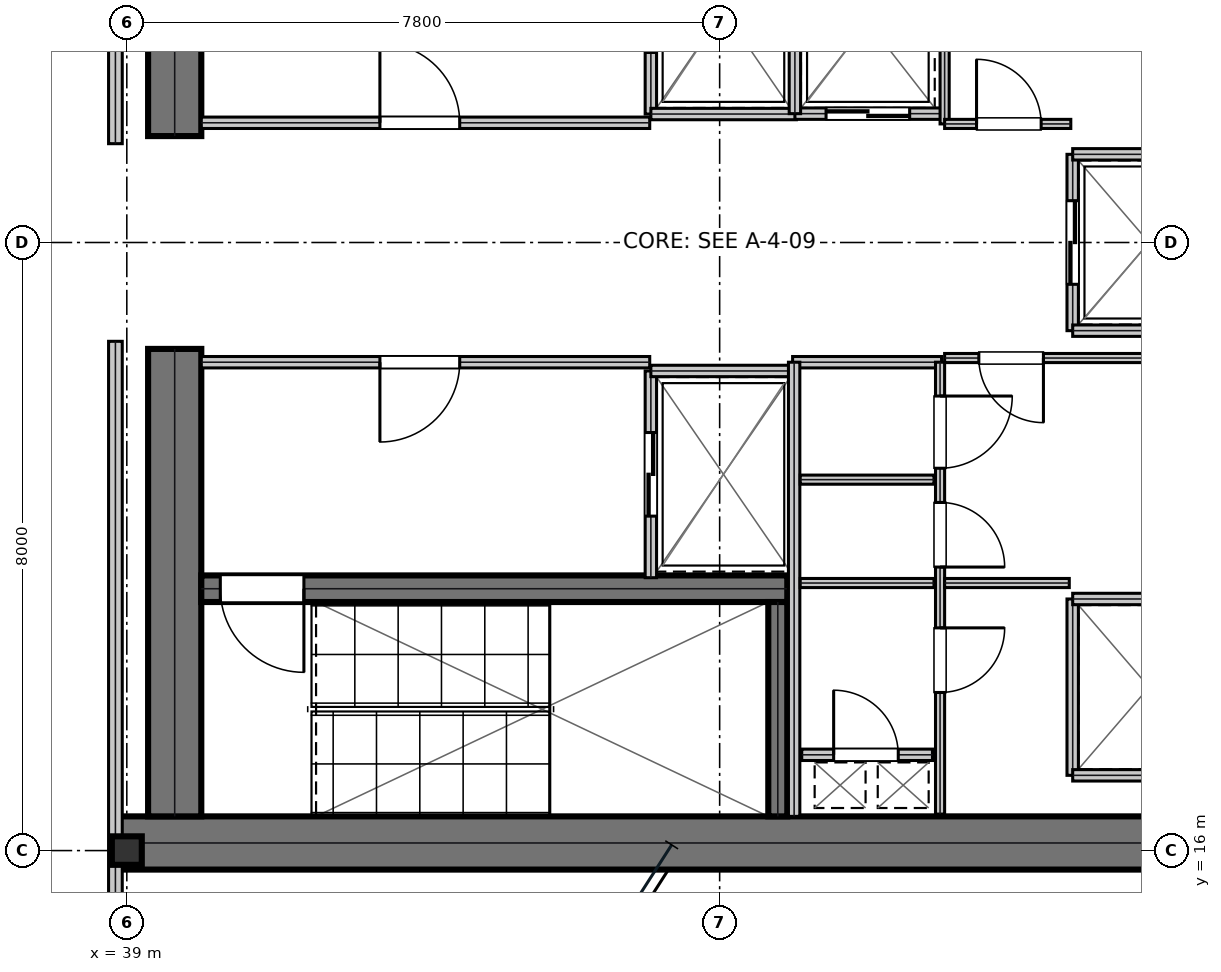
"""IFC4 building model, lengths in metres.
Left out: names, types, materials, properties, quantities, classifications, styles, units other than length and angle.
Written with IfcOpenShell. Run it as: python <this file> out.ifc"""

import sys

from ifc_helpers import new_model, si_unit, direction, frame, frame_2d, origin, origin_2d, place, context, subcontext, project, spatial, rectangle, i_section, extrude, element, fill, save


model = new_model("IFC4")
c1 = context("Model", 3, precision=1e-05, world=origin(), true_north=direction((0.0, 1.0)))
c2 = subcontext(c1, "Body", "Model", "MODEL_VIEW")
j1 = project(units=[si_unit("LENGTHUNIT", "METRE"), si_unit("PLANEANGLEUNIT", "RADIAN")], contexts=[c1])
p1 = place(None, origin())
s1 = spatial("IfcSite", under=j1, at=p1, CompositionType="ELEMENT")
p2 = place(p1, origin())
s2 = spatial("IfcBuilding", under=s1, at=p2, CompositionType="ELEMENT")
p3 = place(p2, frame((0.0, 0.0, 195.9)))
s3 = spatial("IfcBuildingStorey", under=s2, at=p3, CompositionType="ELEMENT", Elevation=195.9)
p4 = place(p3, frame((38.8, 16.1, 0.0), z_axis=(0.0, 0.0, 1.0), x_axis=(1.0, 0.0, 0.0)))
e1 = element("IfcWall", 1, at=p4, inside=s3, PredefinedType="SHEAR", context=c2, shape_type="SweptSolid", body=[
    extrude(rectangle(XDim=16.0, YDim=0.7, at=frame_2d((8.0, 0.0))), origin(), (0.0, 0.0, 1.0), 3.79),
])
for number, where, z_axis, x_axis in (
    (2, (39.63, 16.45, 0.0), (0.0, 0.0, 1.0), (0.0, 1.0, 0.0)),
    (3, (39.63, 25.4, 0.0), (0.0, 0.0, 1.0), (0.0, 1.0, 0.0)),
):
    element("IfcWall", number, at=place(p3, frame(where, z_axis=z_axis, x_axis=x_axis)), inside=s3, PredefinedType="SHEAR", context=c2, shape_type="SweptSolid", body=[
        extrude(rectangle(XDim=6.15, YDim=0.7, at=frame_2d((3.075, 0.0))), origin(), (0.0, 0.0, 1.0), 3.79),
    ])
p5 = place(p3, frame((39.98, 19.445, 0.0), z_axis=(0.0, 0.0, 1.0), x_axis=(1.0, 0.0, 0.0)))
e4 = element("IfcWall", 4, at=p5, inside=s3, PredefinedType="SHEAR", context=c2, shape_type="SweptSolid", body=[
    extrude(rectangle(XDim=7.71, YDim=0.35, at=frame_2d((3.855, 0.0))), origin(), (0.0, 0.0, 1.0), 3.79),
])
p6 = place(p5, frame((0.25, 0.0, 0.0)))
e5 = element("IfcOpeningElement", 5, at=p6, cuts=e4, PredefinedType="OPENING", context=c2, shape_type="SweptSolid", body=[
    extrude(rectangle(XDim=1.1, YDim=2.15, at=frame_2d((0.55, 1.075))), frame((0.0, 0.185, 0.0), z_axis=(0.0, -1.0, 0.0), x_axis=(1.0, 0.0, 0.0)), (0.0, 0.0, 1.0), 0.37),
])
p7 = place(p3, frame((47.565, 16.45, 0.0), z_axis=(0.0, 0.0, 1.0), x_axis=(0.0, 1.0, 0.0)))
e6 = element("IfcWall", 6, at=p7, inside=s3, PredefinedType="SHEAR", context=c2, shape_type="SweptSolid", body=[
    extrude(rectangle(XDim=2.82, YDim=0.25, at=frame_2d((1.41, 0.0))), origin(), (0.0, 0.0, 1.0), 3.79),
])
p8 = place(p3, frame((39.0, 16.0, 0.0), z_axis=(0.0, 0.0, 1.0), x_axis=(1.0, 0.0, 0.0)))
e7 = element("IfcColumn", 7, at=p8, inside=s3, PredefinedType="COLUMN", context=c2, shape_type="SweptSolid", body=[
    extrude(i_section(OverallWidth=0.394, OverallDepth=0.375, WebThickness=0.017, FlangeThickness=0.028, at=origin_2d()), origin(), (0.0, 0.0, 1.0), 4.044),
])
p9 = place(p3, frame((39.98, 25.575, 0.0), z_axis=(0.0, 0.0, 1.0), x_axis=(1.0, 0.0, 0.0)))
e8 = element("IfcWall", 8, at=p9, inside=s3, PredefinedType="PARTITIONING", context=c2, shape_type="SweptSolid", body=[
    extrude(rectangle(XDim=5.9, YDim=0.15, at=frame_2d((2.95, 0.0))), origin(), (0.0, 0.0, 1.0), 3.79),
])
p10 = place(p9, frame((2.35, 0.0, 0.0)))
e9 = element("IfcOpeningElement", 9, at=p10, cuts=e8, PredefinedType="OPENING", context=c2, shape_type="SweptSolid", body=[
    extrude(rectangle(XDim=1.05, YDim=2.15, at=frame_2d((0.525, 1.075))), frame((0.0, 0.085, 0.0), z_axis=(0.0, -1.0, 0.0), x_axis=(1.0, 0.0, 0.0)), (0.0, 0.0, 1.0), 0.17),
])
p11 = place(p3, frame((39.98, 22.425, 0.0), z_axis=(0.0, 0.0, 1.0), x_axis=(1.0, 0.0, 0.0)))
e10 = element("IfcWall", 10, at=p11, inside=s3, PredefinedType="PARTITIONING", context=c2, shape_type="SweptSolid", body=[
    extrude(rectangle(XDim=5.9, YDim=0.15, at=frame_2d((2.95, 0.0))), origin(), (0.0, 0.0, 1.0), 3.79),
])
p12 = place(p11, frame((2.35, 0.0, 0.0)))
e11 = element("IfcOpeningElement", 11, at=p12, cuts=e10, PredefinedType="OPENING", context=c2, shape_type="SweptSolid", body=[
    extrude(rectangle(XDim=1.05, YDim=2.15, at=frame_2d((0.525, 1.075))), frame((0.0, 0.085, 0.0), z_axis=(0.0, -1.0, 0.0), x_axis=(1.0, 0.0, 0.0)), (0.0, 0.0, 1.0), 0.17),
])
p13 = place(p3, frame((45.895, 25.69, 0.0), z_axis=(0.0, 0.0, 1.0), x_axis=(0.0, 1.0, 0.0)))
e12 = element("IfcWall", 12, at=p13, inside=s3, PredefinedType="PARTITIONING", context=c2, shape_type="SweptSolid", body=[
    extrude(rectangle(XDim=2.72, YDim=0.15, at=frame_2d((1.36, 0.0))), origin(), (0.0, 0.0, 1.0), 3.79),
])
p14 = place(p13, frame((0.81, 0.0, 0.0)))
e13 = element("IfcOpeningElement", 13, at=p14, cuts=e12, PredefinedType="OPENING", context=c2, shape_type="SweptSolid", body=[
    extrude(rectangle(XDim=1.1, YDim=2.15, at=frame_2d((0.55, 1.075))), frame((0.0, 0.085, 0.0), z_axis=(0.0, -1.0, 0.0), x_axis=(1.0, 0.0, 0.0)), (0.0, 0.0, 1.0), 0.17),
])
p15 = place(p3, frame((45.895, 25.69, 0.0), z_axis=(0.0, 0.0, 1.0), x_axis=(1.0, 0.0, 0.0)))
e14 = element("IfcWall", 14, at=p15, inside=s3, PredefinedType="PARTITIONING", context=c2, shape_type="SweptSolid", body=[
    extrude(rectangle(XDim=1.915, YDim=0.15, at=frame_2d((0.958, 0.0))), origin(), (0.0, 0.0, 1.0), 3.79),
])
p16 = place(p3, frame((45.895, 19.59, 0.0), z_axis=(0.0, 0.0, 1.0), x_axis=(0.0, 1.0, 0.0)))
e15 = element("IfcWall", 15, at=p16, inside=s3, PredefinedType="PARTITIONING", context=c2, shape_type="SweptSolid", body=[
    extrude(rectangle(XDim=2.72, YDim=0.15, at=frame_2d((1.36, 0.0))), origin(), (0.0, 0.0, 1.0), 3.79),
])
p17 = place(p16, frame((0.81, 0.0, 0.0)))
e16 = element("IfcOpeningElement", 16, at=p17, cuts=e15, PredefinedType="OPENING", context=c2, shape_type="SweptSolid", body=[
    extrude(rectangle(XDim=1.1, YDim=2.15, at=frame_2d((0.55, 1.075))), frame((0.0, 0.085, 0.0), z_axis=(0.0, -1.0, 0.0), x_axis=(1.0, 0.0, 0.0)), (0.0, 0.0, 1.0), 0.17),
])
p18 = place(p3, frame((45.895, 22.31, 0.0), z_axis=(0.0, 0.0, 1.0), x_axis=(1.0, 0.0, 0.0)))
e17 = element("IfcWall", 17, at=p18, inside=s3, PredefinedType="PARTITIONING", context=c2, shape_type="SweptSolid", body=[
    extrude(rectangle(XDim=1.915, YDim=0.15, at=frame_2d((0.958, 0.0))), origin(), (0.0, 0.0, 1.0), 3.79),
])
p19 = place(p3, frame((47.79, 25.695, 0.0), z_axis=(0.0, 0.0, 1.0), x_axis=(1.0, 0.0, 0.0)))
e18 = element("IfcWall", 18, at=p19, inside=s3, PredefinedType="PARTITIONING", context=c2, shape_type="SweptSolid", body=[
    extrude(rectangle(XDim=1.92, YDim=0.15, at=frame_2d((0.96, 0.0))), origin(), (0.0, 0.0, 1.0), 3.79),
])
p20 = place(p19, frame((0.41, 0.0, 0.0)))
e19 = element("IfcOpeningElement", 19, at=p20, cuts=e18, PredefinedType="OPENING", context=c2, shape_type="SweptSolid", body=[
    extrude(rectangle(XDim=1.1, YDim=2.15, at=frame_2d((0.55, 1.075))), frame((0.0, 0.085, 0.0), z_axis=(0.0, -1.0, 0.0), x_axis=(1.0, 0.0, 0.0)), (0.0, 0.0, 1.0), 0.17),
])
p21 = place(p3, frame((47.79, 25.695, 0.0), z_axis=(0.0, 0.0, 1.0), x_axis=(0.0, 1.0, 0.0)))
e20 = element("IfcWall", 20, at=p21, inside=s3, PredefinedType="PARTITIONING", context=c2, shape_type="SweptSolid", body=[
    extrude(rectangle(XDim=2.415, YDim=0.15, at=frame_2d((1.208, 0.0))), origin(), (0.0, 0.0, 1.0), 3.79),
])
p22 = place(p3, frame((51.445, 22.84, 0.0), z_axis=(0.0, 0.0, 1.0), x_axis=(0.0, 1.0, 0.0)))
e21 = element("IfcWall", 21, at=p22, inside=s3, PredefinedType="PARTITIONING", context=c2, shape_type="SweptSolid", body=[
    extrude(rectangle(XDim=2.32, YDim=0.15, at=frame_2d((1.16, 0.0))), origin(), (0.0, 0.0, 1.0), 3.79),
])
p23 = place(p22, frame((0.61, 0.0, 0.0)))
e22 = element("IfcOpeningElement", 22, at=p23, cuts=e21, PredefinedType="OPENING", context=c2, shape_type="SweptSolid", body=[
    extrude(rectangle(XDim=1.1, YDim=2.15, at=frame_2d((0.55, 1.075))), frame((0.0, 0.085, 0.0), z_axis=(0.0, -1.0, 0.0), x_axis=(1.0, 0.0, 0.0)), (0.0, 0.0, 1.0), 0.17),
])
for number, where, z_axis, x_axis in (
    (23, (51.445, 22.84, 0.0), (0.0, 0.0, 1.0), (1.0, 0.0, 0.0)),
    (24, (51.445, 25.16, 0.0), (0.0, 0.0, 1.0), (1.0, 0.0, 0.0)),
):
    element("IfcWall", number, at=place(p3, frame(where, z_axis=z_axis, x_axis=x_axis)), inside=s3, PredefinedType="PARTITIONING", context=c2, shape_type="SweptSolid", body=[
        extrude(rectangle(XDim=2.015, YDim=0.15, at=frame_2d((1.007, 0.0))), origin(), (0.0, 0.0, 1.0), 3.79),
    ])
p24 = place(p3, frame((51.445, 16.99, 0.0), z_axis=(0.0, 0.0, 1.0), x_axis=(0.0, 1.0, 0.0)))
e25 = element("IfcWall", 25, at=p24, inside=s3, PredefinedType="PARTITIONING", context=c2, shape_type="SweptSolid", body=[
    extrude(rectangle(XDim=2.32, YDim=0.15, at=frame_2d((1.16, 0.0))), origin(), (0.0, 0.0, 1.0), 3.79),
])
for number, where, z_axis, x_axis in (
    (26, (51.445, 16.99, 0.0), (0.0, 0.0, 1.0), (1.0, 0.0, 0.0)),
    (27, (51.445, 19.31, 0.0), (0.0, 0.0, 1.0), (1.0, 0.0, 0.0)),
):
    element("IfcWall", number, at=place(p3, frame(where, z_axis=z_axis, x_axis=x_axis)), inside=s3, PredefinedType="PARTITIONING", context=c2, shape_type="SweptSolid", body=[
        extrude(rectangle(XDim=2.015, YDim=0.15, at=frame_2d((1.007, 0.0))), origin(), (0.0, 0.0, 1.0), 3.79),
    ])
p25 = place(p3, frame((47.88, 17.26, 0.0), z_axis=(0.0, 0.0, 1.0), x_axis=(1.0, 0.0, 0.0)))
e28 = element("IfcWall", 28, at=p25, inside=s3, PredefinedType="PARTITIONING", context=c2, shape_type="SweptSolid", body=[
    extrude(rectangle(XDim=1.72, YDim=0.15, at=frame_2d((0.86, 0.0))), origin(), (0.0, 0.0, 1.0), 3.79),
])
p26 = place(p25, frame((0.42, 0.0, 0.0)))
e29 = element("IfcOpeningElement", 29, at=p26, cuts=e28, PredefinedType="OPENING", context=c2, shape_type="SweptSolid", body=[
    extrude(rectangle(XDim=0.85, YDim=2.15, at=frame_2d((0.425, 1.075))), frame((0.0, 0.085, 0.0), z_axis=(0.0, -1.0, 0.0), x_axis=(1.0, 0.0, 0.0)), (0.0, 0.0, 1.0), 0.17),
])
p27 = place(p3, frame((47.76, 22.425, 0.0), z_axis=(0.0, 0.0, 1.0), x_axis=(1.0, 0.0, 0.0)))
e30 = element("IfcWall", 30, at=p27, inside=s3, PredefinedType="PARTITIONING", context=c2, shape_type="SweptSolid", body=[
    extrude(rectangle(XDim=1.96, YDim=0.15, at=frame_2d((0.98, 0.0))), origin(), (0.0, 0.0, 1.0), 3.79),
])
p28 = place(p3, frame((47.78, 16.45, 0.0), z_axis=(0.0, 0.0, 1.0), x_axis=(0.0, 1.0, 0.0)))
e31 = element("IfcWall", 31, at=p28, inside=s3, PredefinedType="PARTITIONING", context=c2, shape_type="SweptSolid", body=[
    extrude(rectangle(XDim=5.975, YDim=0.15, at=frame_2d((2.988, 0.0))), origin(), (0.0, 0.0, 1.0), 3.79),
])
for number, where, z_axis, x_axis in (
    (32, (47.86, 19.52, 0.0), (0.0, 0.0, 1.0), (1.0, 0.0, 0.0)),
    (33, (47.86, 20.88, 0.0), (0.0, 0.0, 1.0), (1.0, 0.0, 0.0)),
):
    element("IfcWall", number, at=place(p3, frame(where, z_axis=z_axis, x_axis=x_axis)), inside=s3, PredefinedType="PARTITIONING", context=c2, shape_type="SweptSolid", body=[
        extrude(rectangle(XDim=1.76, YDim=0.12, at=frame_2d((0.88, 0.0))), origin(), (0.0, 0.0, 1.0), 3.79),
    ])
p29 = place(p3, frame((49.7, 16.48, 0.0), z_axis=(0.0, 0.0, 1.0), x_axis=(0.0, 1.0, 0.0)))
e34 = element("IfcWall", 34, at=p29, inside=s3, PredefinedType="PARTITIONING", context=c2, shape_type="SweptSolid", body=[
    extrude(rectangle(XDim=5.945, YDim=0.12, at=frame_2d((2.973, 0.0))), origin(), (0.0, 0.0, 1.0), 3.79),
])
p30 = place(p29, frame((1.6, 0.0, 0.0)))
e35 = element("IfcOpeningElement", 35, at=p30, cuts=e34, PredefinedType="OPENING", context=c2, shape_type="SweptSolid", body=[
    extrude(rectangle(XDim=0.85, YDim=2.15, at=frame_2d((0.425, 1.075))), frame((0.0, 0.07, 0.0), z_axis=(0.0, -1.0, 0.0), x_axis=(1.0, 0.0, 0.0)), (0.0, 0.0, 1.0), 0.14),
])
p31 = place(p29, frame((3.25, 0.0, 0.0)))
e36 = element("IfcOpeningElement", 36, at=p31, cuts=e34, PredefinedType="OPENING", context=c2, shape_type="SweptSolid", body=[
    extrude(rectangle(XDim=0.85, YDim=2.15, at=frame_2d((0.425, 1.075))), frame((0.0, 0.07, 0.0), z_axis=(0.0, -1.0, 0.0), x_axis=(1.0, 0.0, 0.0)), (0.0, 0.0, 1.0), 0.14),
])
p32 = place(p29, frame((4.55, 0.0, 0.0)))
e37 = element("IfcOpeningElement", 37, at=p32, cuts=e34, PredefinedType="OPENING", context=c2, shape_type="SweptSolid", body=[
    extrude(rectangle(XDim=0.95, YDim=2.15, at=frame_2d((0.475, 1.075))), frame((0.0, 0.07, 0.0), z_axis=(0.0, -1.0, 0.0), x_axis=(1.0, 0.0, 0.0)), (0.0, 0.0, 1.0), 0.14),
])
p33 = place(p3, frame((49.76, 22.48, 0.0), z_axis=(0.0, 0.0, 1.0), x_axis=(1.0, 0.0, 0.0)))
e38 = element("IfcWall", 38, at=p33, inside=s3, PredefinedType="PARTITIONING", context=c2, shape_type="SweptSolid", body=[
    extrude(rectangle(XDim=3.9, YDim=0.12, at=frame_2d((1.95, 0.0))), origin(), (0.0, 0.0, 1.0), 3.79),
])
p34 = place(p33, frame((0.45, 0.0, 0.0)))
e39 = element("IfcOpeningElement", 39, at=p34, cuts=e38, PredefinedType="OPENING", context=c2, shape_type="SweptSolid", body=[
    extrude(rectangle(XDim=0.85, YDim=2.15, at=frame_2d((0.425, 1.075))), frame((0.0, 0.07, 0.0), z_axis=(0.0, -1.0, 0.0), x_axis=(1.0, 0.0, 0.0)), (0.0, 0.0, 1.0), 0.14),
])
p35 = place(p3, frame((49.76, 19.52, 0.0), z_axis=(0.0, 0.0, 1.0), x_axis=(1.0, 0.0, 0.0)))
e40 = element("IfcWall", 40, at=p35, inside=s3, PredefinedType="PARTITIONING", context=c2, shape_type="SweptSolid", body=[
    extrude(rectangle(XDim=1.64, YDim=0.12, at=frame_2d((0.82, 0.0))), origin(), (0.0, 0.0, 1.0), 3.79),
])
p36 = place(p3, frame((49.76, 25.56, 0.0), z_axis=(0.0, 0.0, 1.0), x_axis=(0.0, 1.0, 0.0)))
e41 = element("IfcWall", 41, at=p36, inside=s3, PredefinedType="PARTITIONING", context=c2, shape_type="SweptSolid", body=[
    extrude(rectangle(XDim=2.66, YDim=0.12, at=frame_2d((1.33, 0.0))), origin(), (0.0, 0.0, 1.0), 3.79),
])
p37 = place(p3, frame((49.76, 25.56, 0.0), z_axis=(0.0, 0.0, 1.0), x_axis=(1.0, 0.0, 0.0)))
e42 = element("IfcWall", 42, at=p37, inside=s3, PredefinedType="PARTITIONING", context=c2, shape_type="SweptSolid", body=[
    extrude(rectangle(XDim=1.66, YDim=0.12, at=frame_2d((0.83, 0.0))), origin(), (0.0, 0.0, 1.0), 3.79),
])
p38 = place(p37, frame((0.42, 0.0, 0.0)))
e43 = element("IfcOpeningElement", 43, at=p38, cuts=e42, PredefinedType="OPENING", context=c2, shape_type="SweptSolid", body=[
    extrude(rectangle(XDim=0.85, YDim=2.15, at=frame_2d((0.425, 1.075))), frame((0.0, 0.07, 0.0), z_axis=(0.0, -1.0, 0.0), x_axis=(1.0, 0.0, 0.0)), (0.0, 0.0, 1.0), 0.14),
])
for number, where, z_axis, x_axis in (
    (44, (38.85, 14.5, 0.0), (0.0, 0.0, 1.0), (0.0, 1.0, 0.0)),
    (45, (38.85, 25.3, 0.0), (0.0, 0.0, 1.0), (0.0, 1.0, 0.0)),
):
    element("IfcWall", number, at=place(p3, frame(where, z_axis=z_axis, x_axis=x_axis)), inside=s3, PredefinedType="SOLIDWALL", context=c2, shape_type="SweptSolid", body=[
        extrude(rectangle(XDim=8.2, YDim=0.18, at=frame_2d((4.1, 0.0))), origin(), (0.0, 0.0, 1.0), 3.241),
    ])
p39 = place(p10, origin())
e46 = element("IfcDoor", 46, at=p39, inside=s3, OperationType="SINGLE_SWING_LEFT", PredefinedType="DOOR", context=c2, shape_type="SweptSolid", body=[
    extrude(rectangle(XDim=1.05, YDim=2.15, at=frame_2d((0.525, 1.075))), frame((0.0, 0.025, 0.0), z_axis=(0.0, -1.0, 0.0), x_axis=(1.0, 0.0, 0.0)), (0.0, 0.0, 1.0), 0.05),
])
fill(e9, e46)
p40 = place(p12, frame((1.05, 0.0, 0.0), z_axis=(0.0, 0.0, 1.0), x_axis=(-1.0, 0.0, 0.0)))
e47 = element("IfcDoor", 47, at=p40, inside=s3, OperationType="SINGLE_SWING_RIGHT", PredefinedType="DOOR", context=c2, shape_type="SweptSolid", body=[
    extrude(rectangle(XDim=1.05, YDim=2.15, at=frame_2d((0.525, 1.075))), frame((0.0, 0.025, 0.0), z_axis=(0.0, -1.0, 0.0), x_axis=(1.0, 0.0, 0.0)), (0.0, 0.0, 1.0), 0.05),
])
fill(e11, e47)
p41 = place(p17, frame((1.1, 0.0, 0.0), z_axis=(0.0, 0.0, 1.0), x_axis=(-1.0, 0.0, 0.0)))
e48 = element("IfcDoor", 48, at=p41, inside=s3, OperationType="DOUBLE_DOOR_SLIDING", PredefinedType="DOOR", context=c2, shape_type="SweptSolid", body=[
    extrude(rectangle(XDim=1.1, YDim=2.15, at=frame_2d((0.55, 1.075))), frame((0.0, 0.025, 0.0), z_axis=(0.0, -1.0, 0.0), x_axis=(1.0, 0.0, 0.0)), (0.0, 0.0, 1.0), 0.05),
])
fill(e16, e48)
p42 = place(p20, frame((1.1, 0.0, 0.0), z_axis=(0.0, 0.0, 1.0), x_axis=(-1.0, 0.0, 0.0)))
e49 = element("IfcDoor", 49, at=p42, inside=s3, OperationType="DOUBLE_DOOR_SLIDING", PredefinedType="DOOR", context=c2, shape_type="SweptSolid", body=[
    extrude(rectangle(XDim=1.1, YDim=2.15, at=frame_2d((0.55, 1.075))), frame((0.0, 0.025, 0.0), z_axis=(0.0, -1.0, 0.0), x_axis=(1.0, 0.0, 0.0)), (0.0, 0.0, 1.0), 0.05),
])
fill(e19, e49)
p43 = place(p23, frame((1.1, 0.0, 0.0), z_axis=(0.0, 0.0, 1.0), x_axis=(-1.0, 0.0, 0.0)))
e50 = element("IfcDoor", 50, at=p43, inside=s3, OperationType="DOUBLE_DOOR_SLIDING", PredefinedType="DOOR", context=c2, shape_type="SweptSolid", body=[
    extrude(rectangle(XDim=1.1, YDim=2.15, at=frame_2d((0.55, 1.075))), frame((0.0, 0.025, 0.0), z_axis=(0.0, -1.0, 0.0), x_axis=(1.0, 0.0, 0.0)), (0.0, 0.0, 1.0), 0.05),
])
fill(e22, e50)
p44 = place(p26, origin())
e51 = element("IfcDoor", 51, at=p44, inside=s3, OperationType="SINGLE_SWING_LEFT", PredefinedType="TRAPDOOR", context=c2, shape_type="SweptSolid", body=[
    extrude(rectangle(XDim=0.85, YDim=2.15, at=frame_2d((0.425, 1.075))), frame((0.0, 0.025, 0.0), z_axis=(0.0, -1.0, 0.0), x_axis=(1.0, 0.0, 0.0)), (0.0, 0.0, 1.0), 0.05),
])
fill(e29, e51)
p45 = place(p30, frame((0.85, 0.0, 0.0), z_axis=(0.0, 0.0, 1.0), x_axis=(-1.0, 0.0, 0.0)))
e52 = element("IfcDoor", 52, at=p45, inside=s3, OperationType="SINGLE_SWING_LEFT", PredefinedType="DOOR", context=c2, shape_type="SweptSolid", body=[
    extrude(rectangle(XDim=0.85, YDim=2.15, at=frame_2d((0.425, 1.075))), frame((0.0, 0.025, 0.0), z_axis=(0.0, -1.0, 0.0), x_axis=(1.0, 0.0, 0.0)), (0.0, 0.0, 1.0), 0.05),
])
fill(e35, e52)
p46 = place(p31, frame((0.85, 0.0, 0.0), z_axis=(0.0, 0.0, 1.0), x_axis=(-1.0, 0.0, 0.0)))
e53 = element("IfcDoor", 53, at=p46, inside=s3, OperationType="SINGLE_SWING_RIGHT", PredefinedType="DOOR", context=c2, shape_type="SweptSolid", body=[
    extrude(rectangle(XDim=0.85, YDim=2.15, at=frame_2d((0.425, 1.075))), frame((0.0, 0.025, 0.0), z_axis=(0.0, -1.0, 0.0), x_axis=(1.0, 0.0, 0.0)), (0.0, 0.0, 1.0), 0.05),
])
fill(e36, e53)
p47 = place(p32, frame((0.95, 0.0, 0.0), z_axis=(0.0, 0.0, 1.0), x_axis=(-1.0, 0.0, 0.0)))
e54 = element("IfcDoor", 54, at=p47, inside=s3, OperationType="SINGLE_SWING_LEFT", PredefinedType="DOOR", context=c2, shape_type="SweptSolid", body=[
    extrude(rectangle(XDim=0.95, YDim=2.15, at=frame_2d((0.475, 1.075))), frame((0.0, 0.025, 0.0), z_axis=(0.0, -1.0, 0.0), x_axis=(1.0, 0.0, 0.0)), (0.0, 0.0, 1.0), 0.05),
])
fill(e37, e54)
p48 = place(p34, frame((0.85, 0.0, 0.0), z_axis=(0.0, 0.0, 1.0), x_axis=(-1.0, 0.0, 0.0)))
e55 = element("IfcDoor", 55, at=p48, inside=s3, OperationType="SINGLE_SWING_LEFT", PredefinedType="DOOR", context=c2, shape_type="SweptSolid", body=[
    extrude(rectangle(XDim=0.85, YDim=2.15, at=frame_2d((0.425, 1.075))), frame((0.0, 0.025, 0.0), z_axis=(0.0, -1.0, 0.0), x_axis=(1.0, 0.0, 0.0)), (0.0, 0.0, 1.0), 0.05),
])
fill(e39, e55)
p49 = place(p38, origin())
e56 = element("IfcDoor", 56, at=p49, inside=s3, OperationType="SINGLE_SWING_LEFT", PredefinedType="DOOR", context=c2, shape_type="SweptSolid", body=[
    extrude(rectangle(XDim=0.85, YDim=2.15, at=frame_2d((0.425, 1.075))), frame((0.0, 0.025, 0.0), z_axis=(0.0, -1.0, 0.0), x_axis=(1.0, 0.0, 0.0)), (0.0, 0.0, 1.0), 0.05),
])
fill(e43, e56)
p50 = place(p6, frame((1.1, 0.0, 0.0), z_axis=(0.0, 0.0, 1.0), x_axis=(-1.0, 0.0, 0.0)))
e57 = element("IfcDoor", 57, at=p50, inside=s3, OperationType="SINGLE_SWING_LEFT", PredefinedType="DOOR", context=c2, shape_type="SweptSolid", body=[
    extrude(rectangle(XDim=1.1, YDim=2.15, at=frame_2d((0.55, 1.075))), frame((0.0, 0.025, 0.0), z_axis=(0.0, -1.0, 0.0), x_axis=(1.0, 0.0, 0.0)), (0.0, 0.0, 1.0), 0.05),
])
fill(e5, e57)
save(model, sys.argv[1])
